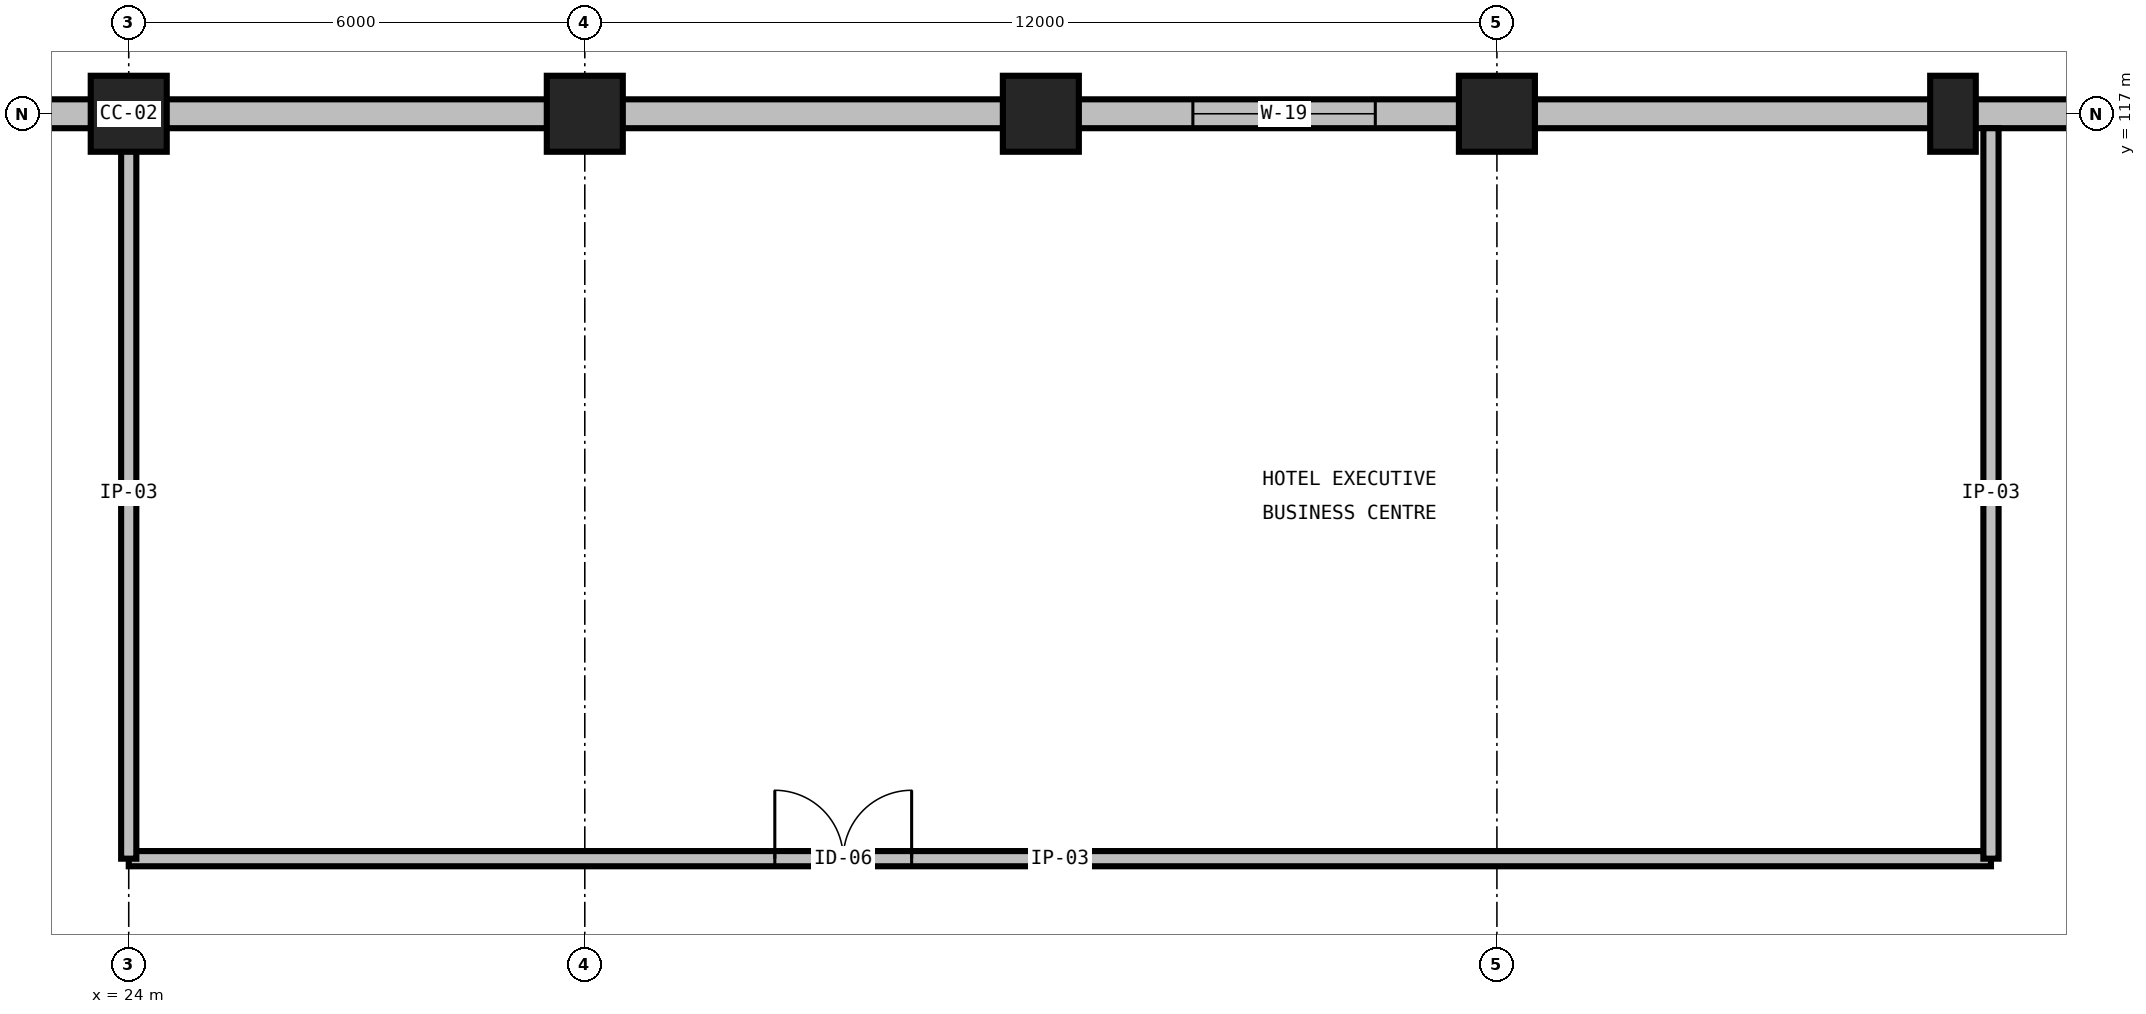
"""IFC4 building model, lengths in metres.
Left out: names, types, materials, properties, quantities, classifications, styles, units other than length and angle.
Written with IfcOpenShell. Run it as: python <this file> out.ifc"""

import sys

from ifc_helpers import new_model, si_unit, direction, frame, frame_2d, origin, origin_2d, place, context, subcontext, project, spatial, rectangle, extrude, element, fill, save


model = new_model("IFC4")
c1 = context("Model", 3, precision=1e-05, world=origin(), true_north=direction((0.0, 1.0)))
c2 = subcontext(c1, "Body", "Model", "MODEL_VIEW")
j1 = project(units=[si_unit("LENGTHUNIT", "METRE"), si_unit("PLANEANGLEUNIT", "RADIAN")], contexts=[c1])
p1 = place(None, origin())
s1 = spatial("IfcSite", under=j1, at=p1, CompositionType="ELEMENT")
p2 = place(p1, origin())
s2 = spatial("IfcBuilding", under=s1, at=p2, CompositionType="ELEMENT")
p3 = place(p2, frame((0.0, 0.0, 18.0)))
s3 = spatial("IfcBuildingStorey", under=s2, at=p3, CompositionType="ELEMENT", Elevation=18.0)
for number, where, z_axis, x_axis in (
    (1, (24.0, 117.0, 0.0), (0.0, 0.0, 1.0), (1.0, 0.0, 0.0)),
    (2, (30.0, 117.0, 0.0), (0.0, 0.0, 1.0), (1.0, 0.0, 0.0)),
    (3, (36.0, 117.0, 0.0), (0.0, 0.0, 1.0), (1.0, 0.0, 0.0)),
    (4, (42.0, 117.0, 0.0), (0.0, 0.0, 1.0), (1.0, 0.0, 0.0)),
):
    element("IfcColumn", number, at=place(p3, frame(where, z_axis=z_axis, x_axis=x_axis)), inside=s3, PredefinedType="COLUMN", context=c2, shape_type="SweptSolid", body=[
        extrude(rectangle(XDim=1.0, YDim=1.0, at=origin_2d()), origin(), (0.0, 0.0, 1.0), 5.4),
    ])
p4 = place(p3, frame((48.0, 117.0, 0.0), z_axis=(0.0, 0.0, 1.0), x_axis=(1.0, 0.0, 0.0)))
e5 = element("IfcColumn", 5, at=p4, inside=s3, PredefinedType="PILASTER", context=c2, shape_type="SweptSolid", body=[
    extrude(rectangle(XDim=0.6, YDim=1.0, at=origin_2d()), origin(), (0.0, 0.0, 1.0), 5.4),
])
p5 = place(p3, frame((24.0, 117.0, 0.0), z_axis=(0.0, 0.0, 1.0), x_axis=(-1.0, 0.0, 0.0)))
e6 = element("IfcWall", 6, at=p5, inside=s3, PredefinedType="STANDARD", context=c2, shape_type="SweptSolid", body=[
    extrude(rectangle(XDim=12.0, YDim=0.38, at=frame_2d((6.0, 0.0))), origin(), (0.0, 0.0, 1.0), 4.176),
])
p6 = place(p5, frame((1.6, 0.0, 0.9)))
e7 = element("IfcOpeningElement", 7, at=p6, cuts=e6, PredefinedType="OPENING", context=c2, shape_type="SweptSolid", body=[
    extrude(rectangle(XDim=2.4, YDim=2.15, at=frame_2d((1.2, 1.075))), frame((0.0, 0.205, 0.0), z_axis=(0.0, -1.0, 0.0), x_axis=(1.0, 0.0, 0.0)), (0.0, 0.0, 1.0), 0.41),
])
p7 = place(p3, frame((30.0, 117.0, 0.0), z_axis=(0.0, 0.0, 1.0), x_axis=(-1.0, 0.0, 0.0)))
e8 = element("IfcWall", 8, at=p7, inside=s3, PredefinedType="STANDARD", context=c2, shape_type="SweptSolid", body=[
    extrude(rectangle(XDim=6.0, YDim=0.38, at=frame_2d((3.0, 0.0))), origin(), (0.0, 0.0, 1.0), 4.176),
])
p8 = place(p3, frame((42.0, 117.0, 0.0), z_axis=(0.0, 0.0, 1.0), x_axis=(-1.0, 0.0, 0.0)))
e9 = element("IfcWall", 9, at=p8, inside=s3, PredefinedType="STANDARD", context=c2, shape_type="SweptSolid", body=[
    extrude(rectangle(XDim=12.0, YDim=0.38, at=frame_2d((6.0, 0.0))), origin(), (0.0, 0.0, 1.0), 4.176),
])
p9 = place(p8, frame((1.6, 0.0, 0.9)))
e10 = element("IfcOpeningElement", 10, at=p9, cuts=e9, PredefinedType="OPENING", context=c2, shape_type="SweptSolid", body=[
    extrude(rectangle(XDim=2.4, YDim=2.15, at=frame_2d((1.2, 1.075))), frame((0.0, 0.205, 0.0), z_axis=(0.0, -1.0, 0.0), x_axis=(1.0, 0.0, 0.0)), (0.0, 0.0, 1.0), 0.41),
])
p10 = place(p3, frame((54.0, 117.0, 0.0), z_axis=(0.0, 0.0, 1.0), x_axis=(-1.0, 0.0, 0.0)))
e11 = element("IfcWall", 11, at=p10, inside=s3, PredefinedType="STANDARD", context=c2, shape_type="SweptSolid", body=[
    extrude(rectangle(XDim=12.0, YDim=0.38, at=frame_2d((6.0, 0.0))), origin(), (0.0, 0.0, 1.0), 4.176),
])
p11 = place(p3, frame((24.0, 107.2, 0.0), z_axis=(0.0, 0.0, 1.0), x_axis=(1.0, 0.0, 0.0)))
e12 = element("IfcWall", 12, at=p11, inside=s3, PredefinedType="PARTITIONING", context=c2, shape_type="SweptSolid", body=[
    extrude(rectangle(XDim=24.5, YDim=0.2, at=frame_2d((12.25, 0.0))), origin(), (0.0, 0.0, 1.0), 5.08),
])
p12 = place(p11, frame((8.5, 0.0, 0.0)))
e13 = element("IfcOpeningElement", 13, at=p12, cuts=e12, PredefinedType="OPENING", context=c2, shape_type="SweptSolid", body=[
    extrude(rectangle(XDim=1.8, YDim=2.3, at=frame_2d((0.9, 1.15))), frame((0.0, 0.115, 0.0), z_axis=(0.0, -1.0, 0.0), x_axis=(1.0, 0.0, 0.0)), (0.0, 0.0, 1.0), 0.23),
])
p13 = place(p3, frame((48.5, 107.2, 0.0), z_axis=(0.0, 0.0, 1.0), x_axis=(0.0, 1.0, 0.0)))
e14 = element("IfcWall", 14, at=p13, inside=s3, PredefinedType="PARTITIONING", context=c2, shape_type="SweptSolid", body=[
    extrude(rectangle(XDim=9.61, YDim=0.2, at=frame_2d((4.805, 0.0))), origin(), (0.0, 0.0, 1.0), 5.08),
])
p14 = place(p3, frame((24.0, 116.81, 0.0), z_axis=(0.0, 0.0, 1.0), x_axis=(0.0, -1.0, 0.0)))
e15 = element("IfcWall", 15, at=p14, inside=s3, PredefinedType="PARTITIONING", context=c2, shape_type="SweptSolid", body=[
    extrude(rectangle(XDim=9.61, YDim=0.2, at=frame_2d((4.805, 0.0))), origin(), (0.0, 0.0, 1.0), 4.23),
])
p15 = place(p9, origin())
e16 = element("IfcWindow", 16, at=p15, inside=s3, PartitioningType="DOUBLE_PANEL_VERTICAL", PredefinedType="WINDOW", context=c2, shape_type="SweptSolid", body=[
    extrude(rectangle(XDim=2.4, YDim=2.15, at=frame_2d((1.2, 1.075))), frame((0.0, 0.03, 0.0), z_axis=(0.0, -1.0, 0.0), x_axis=(1.0, 0.0, 0.0)), (0.0, 0.0, 1.0), 0.06),
])
fill(e10, e16)
p16 = place(p12, origin())
e17 = element("IfcDoor", 17, at=p16, inside=s3, OperationType="DOUBLE_DOOR_SINGLE_SWING", PredefinedType="DOOR", context=c2, shape_type="SweptSolid", body=[
    extrude(rectangle(XDim=1.8, YDim=2.3, at=frame_2d((0.9, 1.15))), frame((0.0, 0.025, 0.0), z_axis=(0.0, -1.0, 0.0), x_axis=(1.0, 0.0, 0.0)), (0.0, 0.0, 1.0), 0.05),
])
fill(e13, e17)
save(model, sys.argv[1])
